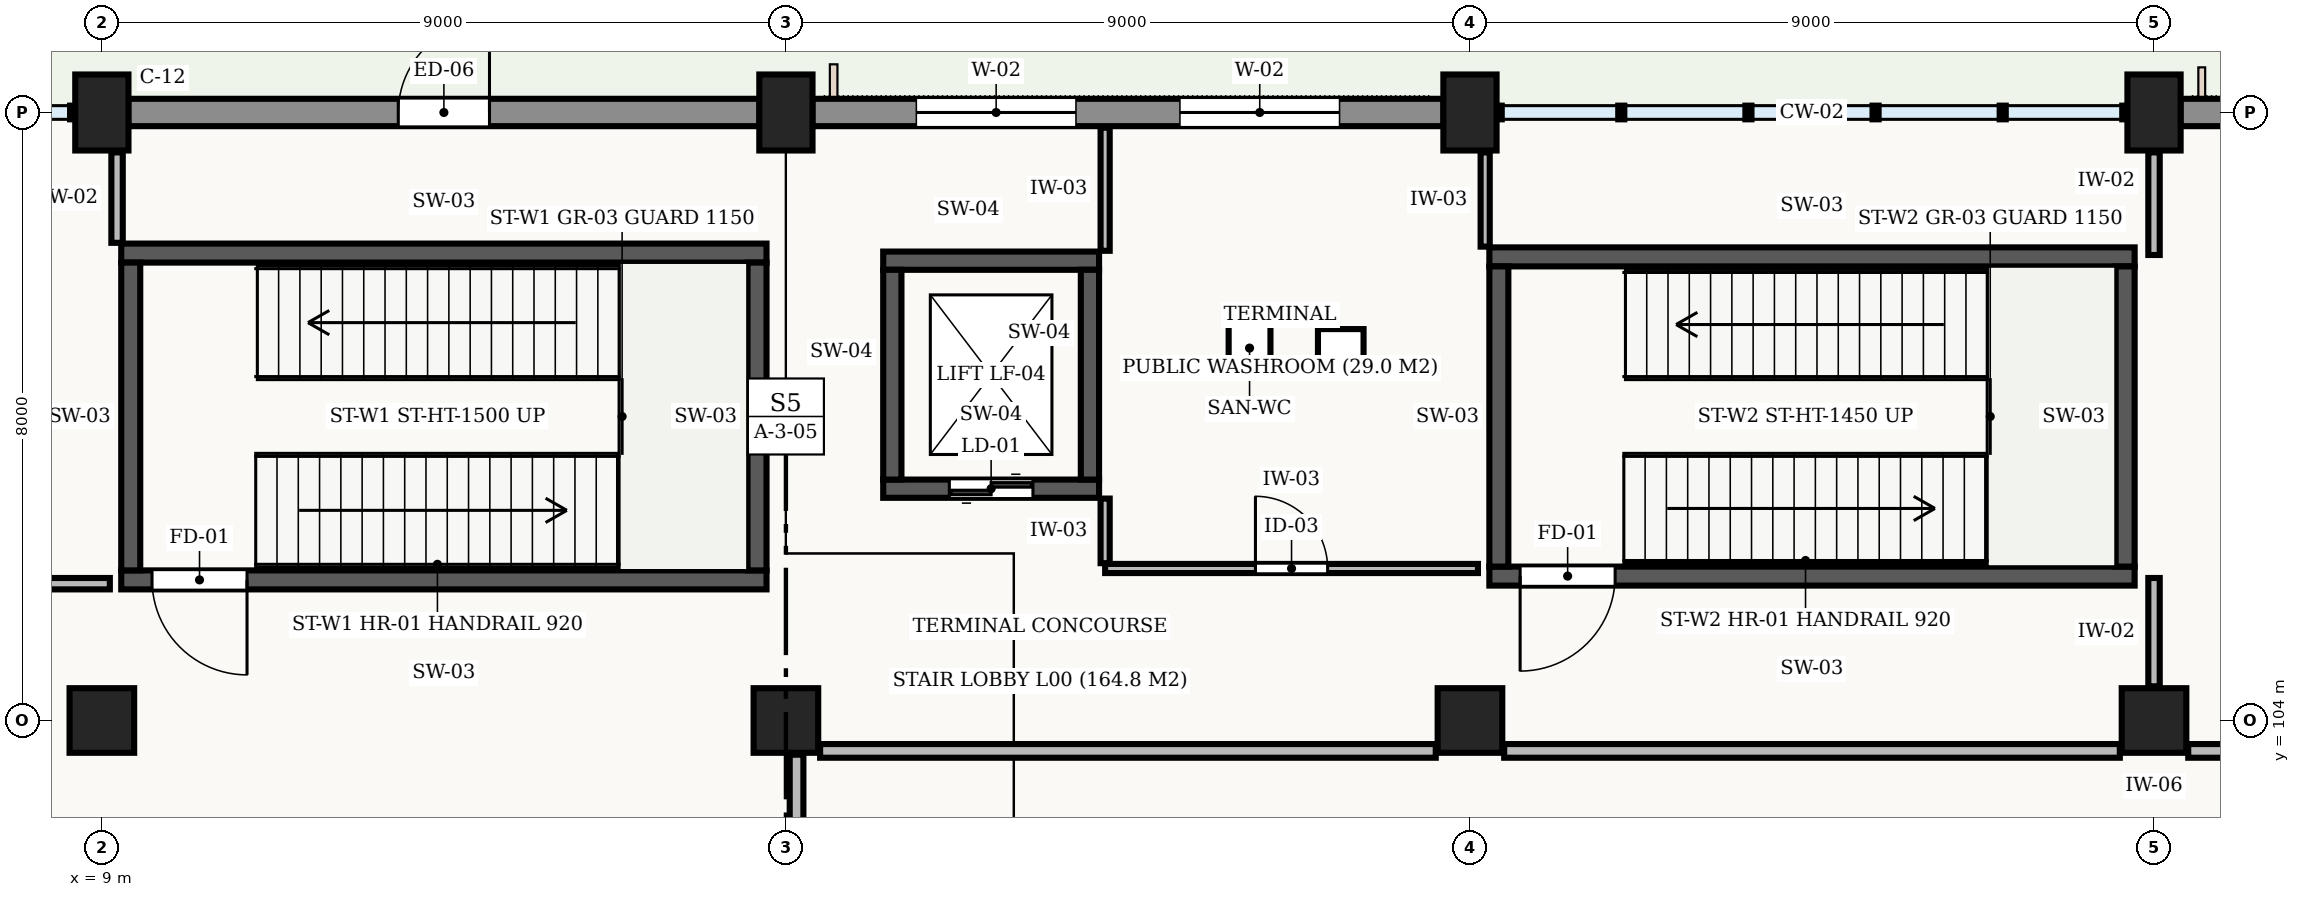
"""IFC4 building model, lengths in metres.
Left out: names, types, materials, properties, quantities, classifications, styles, units other than length and angle.
Written with IfcOpenShell. Run it as: python <this file> out.ifc"""

import sys

from ifc_helpers import new_model, si_unit, direction, frame, frame_2d, origin, origin_2d, place, context, subcontext, project, spatial, rectangle, extrude, element, fill, save


model = new_model("IFC4")
c1 = context("Model", 3, precision=1e-05, world=origin(), true_north=direction((0.0, 1.0)))
c2 = subcontext(c1, "Body", "Model", "MODEL_VIEW")
j1 = project(units=[si_unit("LENGTHUNIT", "METRE"), si_unit("PLANEANGLEUNIT", "RADIAN")], contexts=[c1])
p1 = place(None, origin())
s1 = spatial("IfcSite", under=j1, at=p1, CompositionType="ELEMENT")
p2 = place(p1, origin())
s2 = spatial("IfcBuilding", under=s1, at=p2, CompositionType="ELEMENT")
p3 = place(p2, origin())
s3 = spatial("IfcBuildingStorey", under=s2, at=p3, CompositionType="ELEMENT", Elevation=0.0)
p4 = place(p3, frame((9.0, 104.0, -0.42), z_axis=(0.0, 0.0, 1.0), x_axis=(1.0, 0.0, 0.0)))
e1 = element("IfcColumn", 1, at=p4, inside=s3, PredefinedType="COLUMN", context=c2, shape_type="SweptSolid", body=[
    extrude(rectangle(XDim=0.85, YDim=0.85, at=origin_2d()), origin(), (0.0, 0.0, 1.0), 5.82),
])
p5 = place(p3, frame((9.0, 112.0, -0.42), z_axis=(0.0, 0.0, 1.0), x_axis=(1.0, 0.0, 0.0)))
e2 = element("IfcColumn", 2, at=p5, inside=s3, PredefinedType="COLUMN", context=c2, shape_type="SweptSolid", body=[
    extrude(rectangle(XDim=0.7, YDim=1.0, at=origin_2d()), origin(), (0.0, 0.0, 1.0), 5.82),
])
p6 = place(p3, frame((18.0, 104.0, -0.42), z_axis=(0.0, 0.0, 1.0), x_axis=(1.0, 0.0, 0.0)))
e3 = element("IfcColumn", 3, at=p6, inside=s3, PredefinedType="COLUMN", context=c2, shape_type="SweptSolid", body=[
    extrude(rectangle(XDim=0.85, YDim=0.85, at=origin_2d()), origin(), (0.0, 0.0, 1.0), 5.82),
])
p7 = place(p3, frame((18.0, 112.0, -0.42), z_axis=(0.0, 0.0, 1.0), x_axis=(1.0, 0.0, 0.0)))
e4 = element("IfcColumn", 4, at=p7, inside=s3, PredefinedType="COLUMN", context=c2, shape_type="SweptSolid", body=[
    extrude(rectangle(XDim=0.7, YDim=1.0, at=origin_2d()), origin(), (0.0, 0.0, 1.0), 5.82),
])
p8 = place(p3, frame((27.0, 104.0, -0.42), z_axis=(0.0, 0.0, 1.0), x_axis=(1.0, 0.0, 0.0)))
e5 = element("IfcColumn", 5, at=p8, inside=s3, PredefinedType="COLUMN", context=c2, shape_type="SweptSolid", body=[
    extrude(rectangle(XDim=0.85, YDim=0.85, at=origin_2d()), origin(), (0.0, 0.0, 1.0), 5.82),
])
p9 = place(p3, frame((27.0, 112.0, -0.42), z_axis=(0.0, 0.0, 1.0), x_axis=(1.0, 0.0, 0.0)))
e6 = element("IfcColumn", 6, at=p9, inside=s3, PredefinedType="COLUMN", context=c2, shape_type="SweptSolid", body=[
    extrude(rectangle(XDim=0.7, YDim=1.0, at=origin_2d()), origin(), (0.0, 0.0, 1.0), 5.82),
])
p10 = place(p3, frame((36.0, 104.0, -0.42), z_axis=(0.0, 0.0, 1.0), x_axis=(1.0, 0.0, 0.0)))
e7 = element("IfcColumn", 7, at=p10, inside=s3, PredefinedType="COLUMN", context=c2, shape_type="SweptSolid", body=[
    extrude(rectangle(XDim=0.85, YDim=0.85, at=origin_2d()), origin(), (0.0, 0.0, 1.0), 5.82),
])
p11 = place(p3, frame((36.0, 112.0, -0.42), z_axis=(0.0, 0.0, 1.0), x_axis=(1.0, 0.0, 0.0)))
e8 = element("IfcColumn", 8, at=p11, inside=s3, PredefinedType="COLUMN", context=c2, shape_type="SweptSolid", body=[
    extrude(rectangle(XDim=0.7, YDim=1.0, at=origin_2d()), origin(), (0.0, 0.0, 1.0), 5.82),
])
p12 = place(p3, frame((9.348, 112.0, 0.0), z_axis=(0.0, 0.0, 1.0), x_axis=(1.0, 0.0, 0.0)))
e9 = element("IfcWall", 9, at=p12, inside=s3, PredefinedType="STANDARD", context=c2, shape_type="SweptSolid", body=[
    extrude(rectangle(XDim=8.304, YDim=0.36, at=frame_2d((4.152, 0.0))), origin(), (0.0, 0.0, 1.0), 4.38),
])
p13 = place(p12, frame((3.552, 0.0, 0.0)))
e10 = element("IfcOpeningElement", 10, at=p13, cuts=e9, PredefinedType="OPENING", context=c2, shape_type="SweptSolid", body=[
    extrude(rectangle(XDim=1.2, YDim=2.2, at=frame_2d((0.6, 1.1))), frame((0.0, 0.192, 0.0), z_axis=(0.0, -1.0, 0.0), x_axis=(1.0, 0.0, 0.0)), (0.0, 0.0, 1.0), 0.384),
])
p14 = place(p3, frame((18.348, 112.0, 0.0), z_axis=(0.0, 0.0, 1.0), x_axis=(1.0, 0.0, 0.0)))
e11 = element("IfcWall", 11, at=p14, inside=s3, PredefinedType="STANDARD", context=c2, shape_type="SweptSolid", body=[
    extrude(rectangle(XDim=8.304, YDim=0.36, at=frame_2d((4.152, 0.0))), origin(), (0.0, 0.0, 1.0), 4.38),
])
p15 = place(p14, frame((1.368, 0.0, 0.9)))
e12 = element("IfcOpeningElement", 12, at=p15, cuts=e11, PredefinedType="OPENING", context=c2, shape_type="SweptSolid", body=[
    extrude(rectangle(XDim=2.1, YDim=3.0, at=frame_2d((1.05, 1.5))), frame((0.0, 0.192, 0.0), z_axis=(0.0, -1.0, 0.0), x_axis=(1.0, 0.0, 0.0)), (0.0, 0.0, 1.0), 0.384),
])
p16 = place(p14, frame((4.836, 0.0, 0.9)))
e13 = element("IfcOpeningElement", 13, at=p16, cuts=e11, PredefinedType="OPENING", context=c2, shape_type="SweptSolid", body=[
    extrude(rectangle(XDim=2.1, YDim=3.0, at=frame_2d((1.05, 1.5))), frame((0.0, 0.192, 0.0), z_axis=(0.0, -1.0, 0.0), x_axis=(1.0, 0.0, 0.0)), (0.0, 0.0, 1.0), 0.384),
])
p17 = place(p3, frame((36.348, 112.0, 0.0), z_axis=(0.0, 0.0, 1.0), x_axis=(1.0, 0.0, 0.0)))
e14 = element("IfcWall", 14, at=p17, inside=s3, PredefinedType="STANDARD", context=c2, shape_type="SweptSolid", body=[
    extrude(rectangle(XDim=8.304, YDim=0.36, at=frame_2d((4.152, 0.0))), origin(), (0.0, 0.0, 1.0), 4.38),
])
p18 = place(p17, frame((1.368, 0.0, 0.9)))
e15 = element("IfcOpeningElement", 15, at=p18, cuts=e14, PredefinedType="OPENING", context=c2, shape_type="SweptSolid", body=[
    extrude(rectangle(XDim=2.1, YDim=3.0, at=frame_2d((1.05, 1.5))), frame((0.0, 0.192, 0.0), z_axis=(0.0, -1.0, 0.0), x_axis=(1.0, 0.0, 0.0)), (0.0, 0.0, 1.0), 0.384),
])
p19 = place(p17, frame((4.836, 0.0, 0.9)))
e16 = element("IfcOpeningElement", 16, at=p19, cuts=e14, PredefinedType="OPENING", context=c2, shape_type="SweptSolid", body=[
    extrude(rectangle(XDim=2.1, YDim=3.0, at=frame_2d((1.05, 1.5))), frame((0.0, 0.192, 0.0), z_axis=(0.0, -1.0, 0.0), x_axis=(1.0, 0.0, 0.0)), (0.0, 0.0, 1.0), 0.384),
])
p20 = place(p3, frame((9.255, 105.85, 0.0), z_axis=(0.0, 0.0, 1.0), x_axis=(1.0, 0.0, 0.0)))
e17 = element("IfcWall", 17, at=p20, inside=s3, PredefinedType="SHEAR", context=c2, shape_type="SweptSolid", body=[
    extrude(rectangle(XDim=8.49, YDim=0.25, at=frame_2d((4.245, 0.0))), origin(), (0.0, 0.0, 1.0), 5.05),
])
p21 = place(p20, frame((0.405, 0.0, 0.0)))
e18 = element("IfcOpeningElement", 18, at=p21, cuts=e17, PredefinedType="OPENING", context=c2, shape_type="SweptSolid", body=[
    extrude(rectangle(XDim=1.25, YDim=2.15, at=frame_2d((0.625, 1.075))), frame((0.0, 0.137, 0.0), z_axis=(0.0, -1.0, 0.0), x_axis=(1.0, 0.0, 0.0)), (0.0, 0.0, 1.0), 0.274),
])
p22 = place(p3, frame((17.745, 110.15, 0.0), z_axis=(0.0, 0.0, 1.0), x_axis=(-1.0, 0.0, 0.0)))
e19 = element("IfcWall", 19, at=p22, inside=s3, PredefinedType="SHEAR", context=c2, shape_type="SweptSolid", body=[
    extrude(rectangle(XDim=8.49, YDim=0.25, at=frame_2d((4.245, 0.0))), origin(), (0.0, 0.0, 1.0), 5.05),
])
for number, where, z_axis, x_axis in (
    (20, (9.38, 110.025, 0.0), (0.0, 0.0, 1.0), (0.0, -1.0, 0.0)),
    (21, (17.62, 105.975, 0.0), (0.0, 0.0, 1.0), (0.0, 1.0, 0.0)),
):
    element("IfcWall", number, at=place(p3, frame(where, z_axis=z_axis, x_axis=x_axis)), inside=s3, PredefinedType="SHEAR", context=c2, shape_type="SweptSolid", body=[
        extrude(rectangle(XDim=4.05, YDim=0.25, at=frame_2d((2.025, 0.0))), origin(), (0.0, 0.0, 1.0), 5.05),
    ])
p23 = place(p3, frame((27.255, 105.9, 0.0), z_axis=(0.0, 0.0, 1.0), x_axis=(1.0, 0.0, 0.0)))
e22 = element("IfcWall", 22, at=p23, inside=s3, PredefinedType="SHEAR", context=c2, shape_type="SweptSolid", body=[
    extrude(rectangle(XDim=8.49, YDim=0.25, at=frame_2d((4.245, 0.0))), origin(), (0.0, 0.0, 1.0), 5.05),
])
p24 = place(p23, frame((0.405, 0.0, 0.0)))
e23 = element("IfcOpeningElement", 23, at=p24, cuts=e22, PredefinedType="OPENING", context=c2, shape_type="SweptSolid", body=[
    extrude(rectangle(XDim=1.25, YDim=2.15, at=frame_2d((0.625, 1.075))), frame((0.0, 0.137, 0.0), z_axis=(0.0, -1.0, 0.0), x_axis=(1.0, 0.0, 0.0)), (0.0, 0.0, 1.0), 0.274),
])
p25 = place(p3, frame((35.745, 110.1, 0.0), z_axis=(0.0, 0.0, 1.0), x_axis=(-1.0, 0.0, 0.0)))
e24 = element("IfcWall", 24, at=p25, inside=s3, PredefinedType="SHEAR", context=c2, shape_type="SweptSolid", body=[
    extrude(rectangle(XDim=8.49, YDim=0.25, at=frame_2d((4.245, 0.0))), origin(), (0.0, 0.0, 1.0), 5.05),
])
for number, where, z_axis, x_axis in (
    (25, (27.38, 109.975, 0.0), (0.0, 0.0, 1.0), (0.0, -1.0, 0.0)),
    (26, (35.62, 106.025, 0.0), (0.0, 0.0, 1.0), (0.0, 1.0, 0.0)),
):
    element("IfcWall", number, at=place(p3, frame(where, z_axis=z_axis, x_axis=x_axis)), inside=s3, PredefinedType="SHEAR", context=c2, shape_type="SweptSolid", body=[
        extrude(rectangle(XDim=3.95, YDim=0.25, at=frame_2d((1.975, 0.0))), origin(), (0.0, 0.0, 1.0), 5.05),
    ])
p26 = place(p3, frame((19.28, 107.05, 0.0), z_axis=(0.0, 0.0, 1.0), x_axis=(1.0, 0.0, 0.0)))
e27 = element("IfcWall", 27, at=p26, inside=s3, PredefinedType="SHEAR", context=c2, shape_type="SweptSolid", body=[
    extrude(rectangle(XDim=2.84, YDim=0.24, at=frame_2d((1.42, 0.0))), origin(), (0.0, 0.0, 1.0), 5.05),
])
p27 = place(p26, frame((0.87, 0.0, 0.0)))
e28 = element("IfcOpeningElement", 28, at=p27, cuts=e27, PredefinedType="OPENING", context=c2, shape_type="SweptSolid", body=[
    extrude(rectangle(XDim=1.1, YDim=2.2, at=frame_2d((0.55, 1.1))), frame((0.0, 0.132, 0.0), z_axis=(0.0, -1.0, 0.0), x_axis=(1.0, 0.0, 0.0)), (0.0, 0.0, 1.0), 0.264),
])
p28 = place(p3, frame((22.12, 110.05, 0.0), z_axis=(0.0, 0.0, 1.0), x_axis=(-1.0, 0.0, 0.0)))
e29 = element("IfcWall", 29, at=p28, inside=s3, PredefinedType="SHEAR", context=c2, shape_type="SweptSolid", body=[
    extrude(rectangle(XDim=2.84, YDim=0.24, at=frame_2d((1.42, 0.0))), origin(), (0.0, 0.0, 1.0), 5.05),
])
for number, where, z_axis, x_axis in (
    (30, (19.4, 109.93, 0.0), (0.0, 0.0, 1.0), (0.0, -1.0, 0.0)),
    (31, (22.0, 107.17, 0.0), (0.0, 0.0, 1.0), (0.0, 1.0, 0.0)),
):
    element("IfcWall", number, at=place(p3, frame(where, z_axis=z_axis, x_axis=x_axis)), inside=s3, PredefinedType="SHEAR", context=c2, shape_type="SweptSolid", body=[
        extrude(rectangle(XDim=2.76, YDim=0.24, at=frame_2d((1.38, 0.0))), origin(), (0.0, 0.0, 1.0), 5.05),
    ])
for number, where, z_axis, x_axis in (
    (32, (18.45, 103.6, 0.0), (0.0, 0.0, 1.0), (1.0, 0.0, 0.0)),
    (33, (27.45, 103.6, 0.0), (0.0, 0.0, 1.0), (1.0, 0.0, 0.0)),
):
    element("IfcWall", number, at=place(p3, frame(where, z_axis=z_axis, x_axis=x_axis)), inside=s3, PredefinedType="STANDARD", context=c2, shape_type="SweptSolid", body=[
        extrude(rectangle(XDim=8.1, YDim=0.18, at=frame_2d((4.05, 0.0))), origin(), (0.0, 0.0, 1.0), 5.05),
    ])
p29 = place(p3, frame((36.45, 103.6, 0.0), z_axis=(0.0, 0.0, 1.0), x_axis=(1.0, 0.0, 0.0)))
e34 = element("IfcWall", 34, at=p29, inside=s3, PredefinedType="STANDARD", context=c2, shape_type="SweptSolid", body=[
    extrude(rectangle(XDim=8.1, YDim=0.18, at=frame_2d((4.05, 0.0))), origin(), (0.0, 0.0, 1.0), 5.05),
])
p30 = place(p29, frame((3.55, 0.0, 0.0)))
e35 = element("IfcOpeningElement", 35, at=p30, cuts=e34, PredefinedType="OPENING", context=c2, shape_type="SweptSolid", body=[
    extrude(rectangle(XDim=1.0, YDim=2.1, at=frame_2d((0.5, 1.05))), frame((0.0, 0.102, 0.0), z_axis=(0.0, -1.0, 0.0), x_axis=(1.0, 0.0, 0.0)), (0.0, 0.0, 1.0), 0.204),
])
p31 = place(p3, frame((18.14, 96.45, 0.0), z_axis=(0.0, 0.0, 1.0), x_axis=(0.0, 1.0, 0.0)))
e36 = element("IfcWall", 36, at=p31, inside=s3, PredefinedType="STANDARD", context=c2, shape_type="SweptSolid", body=[
    extrude(rectangle(XDim=7.1, YDim=0.18, at=frame_2d((3.55, 0.0))), origin(), (0.0, 0.0, 1.0), 4.23),
])
p32 = place(p3, frame((0.2, 105.8, 0.0), z_axis=(0.0, 0.0, 1.0), x_axis=(1.0, 0.0, 0.0)))
e37 = element("IfcWall", 37, at=p32, inside=s3, PredefinedType="STANDARD", context=c2, shape_type="SweptSolid", body=[
    extrude(rectangle(XDim=8.905, YDim=0.15, at=frame_2d((4.453, 0.0))), origin(), (0.0, 0.0, 1.0), 5.05),
])
p33 = place(p32, frame((3.625, 0.0, 0.0)))
e38 = element("IfcOpeningElement", 38, at=p33, cuts=e37, PredefinedType="OPENING", context=c2, shape_type="SweptSolid", body=[
    extrude(rectangle(XDim=1.0, YDim=2.1, at=frame_2d((0.5, 1.05))), frame((0.0, 0.087, 0.0), z_axis=(0.0, -1.0, 0.0), x_axis=(1.0, 0.0, 0.0)), (0.0, 0.0, 1.0), 0.174),
])
p34 = place(p3, frame((9.2, 110.285, 0.0), z_axis=(0.0, 0.0, 1.0), x_axis=(0.0, 1.0, 0.0)))
e39 = element("IfcWall", 39, at=p34, inside=s3, PredefinedType="STANDARD", context=c2, shape_type="SweptSolid", body=[
    extrude(rectangle(XDim=1.19, YDim=0.15, at=frame_2d((0.595, 0.0))), origin(), (0.0, 0.0, 1.0), 4.33),
])
p35 = place(p3, frame((36.0, 104.45, 0.0), z_axis=(0.0, 0.0, 1.0), x_axis=(0.0, 1.0, 0.0)))
e40 = element("IfcWall", 40, at=p35, inside=s3, PredefinedType="STANDARD", context=c2, shape_type="SweptSolid", body=[
    extrude(rectangle(XDim=1.425, YDim=0.15, at=frame_2d((0.712, 0.0))), origin(), (0.0, 0.0, 1.0), 4.33),
])
p36 = place(p3, frame((36.0, 110.125, 0.0), z_axis=(0.0, 0.0, 1.0), x_axis=(0.0, 1.0, 0.0)))
e41 = element("IfcWall", 41, at=p36, inside=s3, PredefinedType="STANDARD", context=c2, shape_type="SweptSolid", body=[
    extrude(rectangle(XDim=1.35, YDim=0.15, at=frame_2d((0.675, 0.0))), origin(), (0.0, 0.0, 1.0), 4.33),
])
p37 = place(p3, frame((22.2, 106.0, 0.0), z_axis=(0.0, 0.0, 1.0), x_axis=(1.0, 0.0, 0.0)))
e42 = element("IfcWall", 42, at=p37, inside=s3, PredefinedType="STANDARD", context=c2, shape_type="SweptSolid", body=[
    extrude(rectangle(XDim=4.905, YDim=0.12, at=frame_2d((2.453, 0.0))), origin(), (0.0, 0.0, 1.0), 5.05),
])
p38 = place(p37, frame((1.978, 0.0, 0.0)))
e43 = element("IfcOpeningElement", 43, at=p38, cuts=e42, PredefinedType="OPENING", context=c2, shape_type="SweptSolid", body=[
    extrude(rectangle(XDim=0.95, YDim=2.1, at=frame_2d((0.475, 1.05))), frame((0.0, 0.072, 0.0), z_axis=(0.0, -1.0, 0.0), x_axis=(1.0, 0.0, 0.0)), (0.0, 0.0, 1.0), 0.144),
])
p39 = place(p3, frame((22.2, 106.07, 0.0), z_axis=(0.0, 0.0, 1.0), x_axis=(0.0, 1.0, 0.0)))
e44 = element("IfcWall", 44, at=p39, inside=s3, PredefinedType="STANDARD", context=c2, shape_type="SweptSolid", body=[
    extrude(rectangle(XDim=0.85, YDim=0.12, at=frame_2d((0.425, 0.0))), origin(), (0.0, 0.0, 1.0), 5.05),
])
p40 = place(p3, frame((22.2, 110.18, 0.0), z_axis=(0.0, 0.0, 1.0), x_axis=(0.0, 1.0, 0.0)))
e45 = element("IfcWall", 45, at=p40, inside=s3, PredefinedType="STANDARD", context=c2, shape_type="SweptSolid", body=[
    extrude(rectangle(XDim=1.62, YDim=0.12, at=frame_2d((0.81, 0.0))), origin(), (0.0, 0.0, 1.0), 5.05),
])
p41 = place(p3, frame((27.2, 110.235, 0.0), z_axis=(0.0, 0.0, 1.0), x_axis=(0.0, 1.0, 0.0)))
e46 = element("IfcWall", 46, at=p41, inside=s3, PredefinedType="STANDARD", context=c2, shape_type="SweptSolid", body=[
    extrude(rectangle(XDim=1.24, YDim=0.12, at=frame_2d((0.62, 0.0))), origin(), (0.0, 0.0, 1.0), 4.33),
])
p42 = place(p13, origin())
e47 = element("IfcDoor", 47, at=p42, inside=s3, OperationType="SINGLE_SWING_RIGHT", PredefinedType="DOOR", context=c2, shape_type="SweptSolid", body=[
    extrude(rectangle(XDim=1.2, YDim=2.2, at=frame_2d((0.6, 1.1))), frame((0.0, 0.025, 0.0), z_axis=(0.0, -1.0, 0.0), x_axis=(1.0, 0.0, 0.0)), (0.0, 0.0, 1.0), 0.05),
])
fill(e10, e47)
p43 = place(p15, origin())
e48 = element("IfcWindow", 48, at=p43, inside=s3, PartitioningType="SINGLE_PANEL", PredefinedType="WINDOW", context=c2, shape_type="SweptSolid", body=[
    extrude(rectangle(XDim=2.1, YDim=3.0, at=frame_2d((1.05, 1.5))), frame((0.0, 0.03, 0.0), z_axis=(0.0, -1.0, 0.0), x_axis=(1.0, 0.0, 0.0)), (0.0, 0.0, 1.0), 0.06),
])
fill(e12, e48)
p44 = place(p16, origin())
e49 = element("IfcWindow", 49, at=p44, inside=s3, PartitioningType="SINGLE_PANEL", PredefinedType="WINDOW", context=c2, shape_type="SweptSolid", body=[
    extrude(rectangle(XDim=2.1, YDim=3.0, at=frame_2d((1.05, 1.5))), frame((0.0, 0.03, 0.0), z_axis=(0.0, -1.0, 0.0), x_axis=(1.0, 0.0, 0.0)), (0.0, 0.0, 1.0), 0.06),
])
fill(e13, e49)
p45 = place(p21, frame((1.25, 0.0, 0.0), z_axis=(0.0, 0.0, 1.0), x_axis=(-1.0, 0.0, 0.0)))
e50 = element("IfcDoor", 50, at=p45, inside=s3, OperationType="SINGLE_SWING_LEFT", PredefinedType="DOOR", context=c2, shape_type="SweptSolid", body=[
    extrude(rectangle(XDim=1.25, YDim=2.15, at=frame_2d((0.625, 1.075))), frame((0.0, 0.025, 0.0), z_axis=(0.0, -1.0, 0.0), x_axis=(1.0, 0.0, 0.0)), (0.0, 0.0, 1.0), 0.05),
])
fill(e18, e50)
p46 = place(p24, frame((1.25, 0.0, 0.0), z_axis=(0.0, 0.0, 1.0), x_axis=(-1.0, 0.0, 0.0)))
e51 = element("IfcDoor", 51, at=p46, inside=s3, OperationType="SINGLE_SWING_RIGHT", PredefinedType="DOOR", context=c2, shape_type="SweptSolid", body=[
    extrude(rectangle(XDim=1.25, YDim=2.15, at=frame_2d((0.625, 1.075))), frame((0.0, 0.025, 0.0), z_axis=(0.0, -1.0, 0.0), x_axis=(1.0, 0.0, 0.0)), (0.0, 0.0, 1.0), 0.05),
])
fill(e23, e51)
p47 = place(p27, origin())
e52 = element("IfcDoor", 52, at=p47, inside=s3, OperationType="DOUBLE_DOOR_SLIDING", PredefinedType="DOOR", context=c2, shape_type="SweptSolid", body=[
    extrude(rectangle(XDim=1.1, YDim=2.2, at=frame_2d((0.55, 1.1))), frame((0.0, 0.025, 0.0), z_axis=(0.0, -1.0, 0.0), x_axis=(1.0, 0.0, 0.0)), (0.0, 0.0, 1.0), 0.05),
])
fill(e28, e52)
p48 = place(p38, origin())
e53 = element("IfcDoor", 53, at=p48, inside=s3, OperationType="SINGLE_SWING_LEFT", PredefinedType="DOOR", context=c2, shape_type="SweptSolid", body=[
    extrude(rectangle(XDim=0.95, YDim=2.1, at=frame_2d((0.475, 1.05))), frame((0.0, 0.025, 0.0), z_axis=(0.0, -1.0, 0.0), x_axis=(1.0, 0.0, 0.0)), (0.0, 0.0, 1.0), 0.05),
])
fill(e43, e53)
save(model, sys.argv[1])
